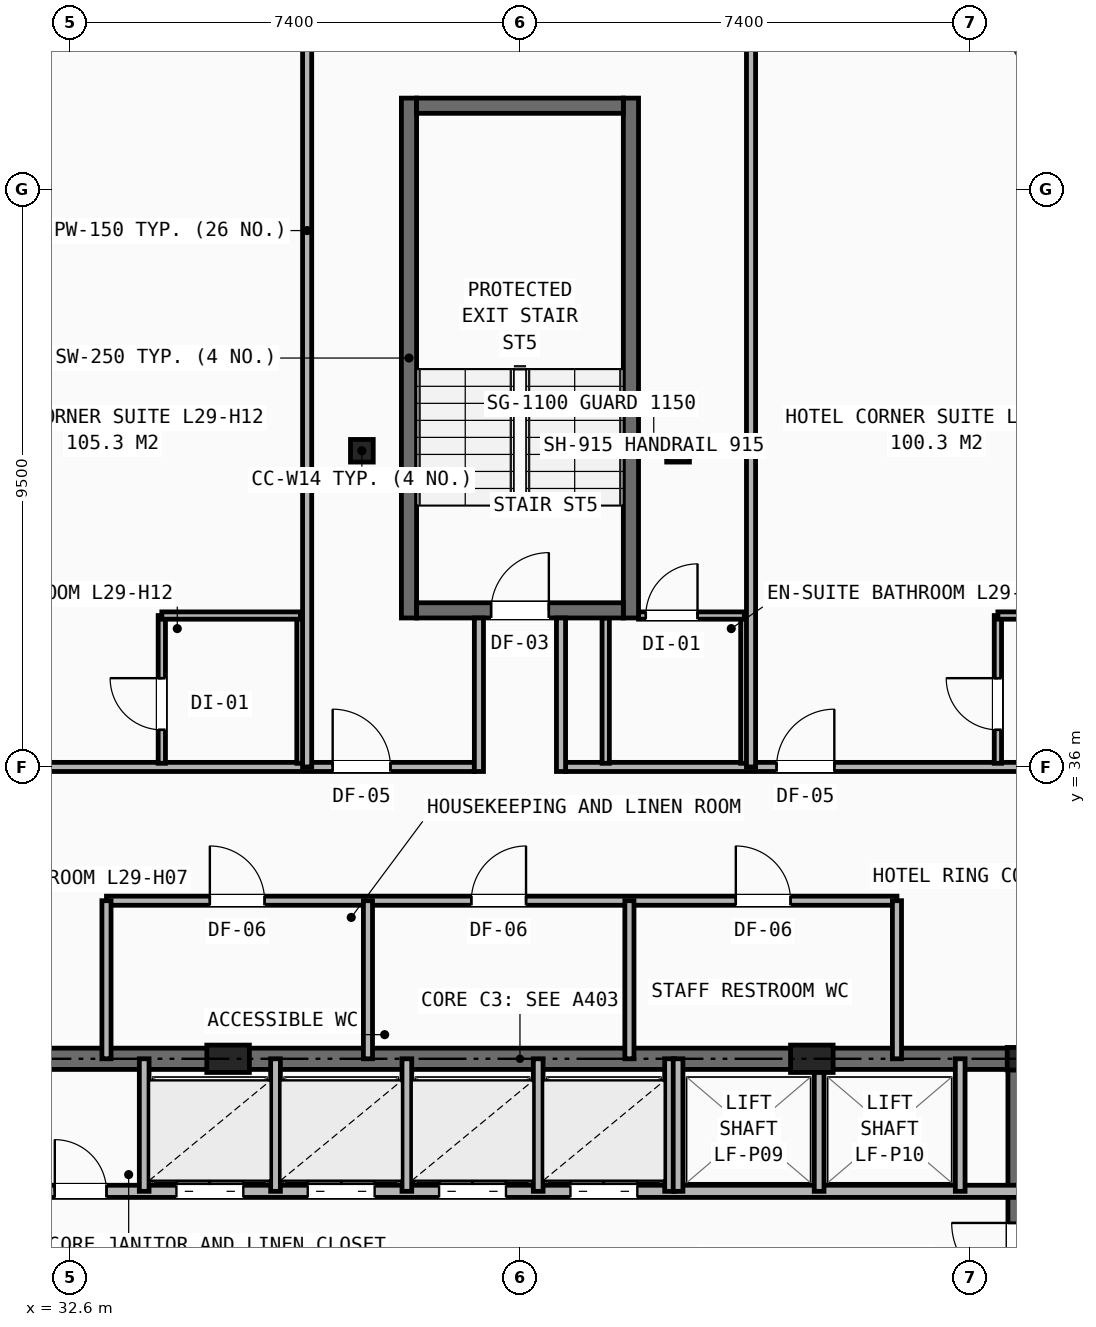
"""IFC4 building model, lengths in metres.
Left out: names, types, materials, properties, quantities, classifications, styles, units other than length and angle.
Written with IfcOpenShell. Run it as: python <this file> out.ifc"""

import sys

from ifc_helpers import new_model, si_unit, direction, frame, frame_2d, origin, origin_2d, place, context, subcontext, project, spatial, rectangle, i_section, extrude, element, fill, save


model = new_model("IFC4")
c1 = context("Model", 3, precision=1e-05, world=origin(), true_north=direction((0.0, 1.0)))
c2 = subcontext(c1, "Body", "Model", "MODEL_VIEW")
j1 = project(units=[si_unit("LENGTHUNIT", "METRE"), si_unit("PLANEANGLEUNIT", "RADIAN")], contexts=[c1])
p1 = place(None, origin())
s1 = spatial("IfcSite", under=j1, at=p1, CompositionType="ELEMENT")
p2 = place(p1, origin())
s2 = spatial("IfcBuilding", under=s1, at=p2, CompositionType="ELEMENT")
p3 = place(p2, frame((0.0, 0.0, 102.2)))
s3 = spatial("IfcBuildingStorey", under=s2, at=p3, CompositionType="ELEMENT", Elevation=102.2)
for number, where, z_axis, x_axis in (
    (1, (48.2, 31.2, 0.0), (0.0, 0.0, 1.0), (1.0, 0.0, 0.0)),
    (2, (37.4, 41.2, 0.0), (0.0, 0.0, 1.0), (1.0, 0.0, 0.0)),
    (3, (42.6, 41.2, 0.0), (0.0, 0.0, 1.0), (1.0, 0.0, 0.0)),
):
    element("IfcColumn", number, at=place(p3, frame(where, z_axis=z_axis, x_axis=x_axis)), inside=s3, PredefinedType="COLUMN", context=c2, shape_type="SweptSolid", body=[
        extrude(i_section(OverallWidth=0.374, OverallDepth=0.372, WebThickness=0.016, FlangeThickness=0.026, at=origin_2d()), origin(), (0.0, 0.0, 1.0), 3.2),
    ])
for number, where, z_axis, x_axis in (
    (4, (35.2, 31.2, 0.0), (0.0, 0.0, 1.0), (1.0, 0.0, 0.0)),
    (5, (44.8, 31.2, 0.0), (0.0, 0.0, 1.0), (1.0, 0.0, 0.0)),
):
    element("IfcColumn", number, at=place(p3, frame(where, z_axis=z_axis, x_axis=x_axis)), inside=s3, PredefinedType="PILASTER", context=c2, shape_type="SweptSolid", body=[
        extrude(rectangle(XDim=0.7, YDim=0.45, at=origin_2d()), origin(), (0.0, 0.0, 1.0), 3.2),
    ])
p4 = place(p3, frame((31.8, 31.2, 0.0), z_axis=(0.0, 0.0, 1.0), x_axis=(1.0, 0.0, 0.0)))
e6 = element("IfcWall", 6, at=p4, inside=s3, PredefinedType="SHEAR", context=c2, shape_type="SweptSolid", body=[
    extrude(rectangle(XDim=16.4, YDim=0.35, at=frame_2d((8.2, 0.0))), origin(), (0.0, 0.0, 1.0), 2.97),
])
p5 = place(p3, frame((48.2, 16.4, 0.0), z_axis=(0.0, 0.0, 1.0), x_axis=(0.0, 1.0, 0.0)))
e7 = element("IfcWall", 7, at=p5, inside=s3, PredefinedType="SHEAR", context=c2, shape_type="SweptSolid", body=[
    extrude(rectangle(XDim=14.8, YDim=0.35, at=frame_2d((7.4, 0.0))), origin(), (0.0, 0.0, 1.0), 2.97),
])
p6 = place(p5, frame((11.0, 0.0, 0.0)))
e8 = element("IfcOpeningElement", 8, at=p6, cuts=e7, PredefinedType="OPENING", context=c2, shape_type="SweptSolid", body=[
    extrude(rectangle(XDim=1.1, YDim=2.15, at=frame_2d((0.55, 1.075))), frame((0.0, 0.185, 0.0), z_axis=(0.0, -1.0, 0.0), x_axis=(1.0, 0.0, 0.0)), (0.0, 0.0, 1.0), 0.37),
])
p7 = place(p3, frame((31.8, 29.02, 0.0), z_axis=(0.0, 0.0, 1.0), x_axis=(1.0, 0.0, 0.0)))
e9 = element("IfcWall", 9, at=p7, inside=s3, PredefinedType="SOLIDWALL", context=c2, shape_type="SweptSolid", body=[
    extrude(rectangle(XDim=16.4, YDim=0.2, at=frame_2d((8.2, 0.0))), origin(), (0.0, 0.0, 1.0), 2.421),
])
p8 = place(p7, frame((0.55, 0.0, 0.0)))
e10 = element("IfcOpeningElement", 10, at=p8, cuts=e9, PredefinedType="OPENING", context=c2, shape_type="SweptSolid", body=[
    extrude(rectangle(XDim=0.85, YDim=2.05, at=frame_2d((0.425, 1.025))), frame((0.0, 0.11, 0.0), z_axis=(0.0, -1.0, 0.0), x_axis=(1.0, 0.0, 0.0)), (0.0, 0.0, 1.0), 0.22),
])
p9 = place(p7, frame((2.55, 0.0, 0.0)))
e11 = element("IfcOpeningElement", 11, at=p9, cuts=e9, PredefinedType="OPENING", context=c2, shape_type="SweptSolid", body=[
    extrude(rectangle(XDim=1.1, YDim=2.15, at=frame_2d((0.55, 1.075))), frame((0.0, 0.11, 0.0), z_axis=(0.0, -1.0, 0.0), x_axis=(1.0, 0.0, 0.0)), (0.0, 0.0, 1.0), 0.22),
])
p10 = place(p7, frame((4.71, 0.0, 0.0)))
e12 = element("IfcOpeningElement", 12, at=p10, cuts=e9, PredefinedType="OPENING", context=c2, shape_type="SweptSolid", body=[
    extrude(rectangle(XDim=1.1, YDim=2.15, at=frame_2d((0.55, 1.075))), frame((0.0, 0.11, 0.0), z_axis=(0.0, -1.0, 0.0), x_axis=(1.0, 0.0, 0.0)), (0.0, 0.0, 1.0), 0.22),
])
p11 = place(p7, frame((6.87, 0.0, 0.0)))
e13 = element("IfcOpeningElement", 13, at=p11, cuts=e9, PredefinedType="OPENING", context=c2, shape_type="SweptSolid", body=[
    extrude(rectangle(XDim=1.1, YDim=2.15, at=frame_2d((0.55, 1.075))), frame((0.0, 0.11, 0.0), z_axis=(0.0, -1.0, 0.0), x_axis=(1.0, 0.0, 0.0)), (0.0, 0.0, 1.0), 0.22),
])
p12 = place(p7, frame((9.03, 0.0, 0.0)))
e14 = element("IfcOpeningElement", 14, at=p12, cuts=e9, PredefinedType="OPENING", context=c2, shape_type="SweptSolid", body=[
    extrude(rectangle(XDim=1.1, YDim=2.15, at=frame_2d((0.55, 1.075))), frame((0.0, 0.11, 0.0), z_axis=(0.0, -1.0, 0.0), x_axis=(1.0, 0.0, 0.0)), (0.0, 0.0, 1.0), 0.22),
])
for number, where, z_axis, x_axis in (
    (15, (33.82, 29.02, 0.0), (0.0, 0.0, 1.0), (0.0, 1.0, 0.0)),
    (16, (35.98, 29.02, 0.0), (0.0, 0.0, 1.0), (0.0, 1.0, 0.0)),
    (17, (38.14, 29.02, 0.0), (0.0, 0.0, 1.0), (0.0, 1.0, 0.0)),
    (18, (40.3, 29.02, 0.0), (0.0, 0.0, 1.0), (0.0, 1.0, 0.0)),
    (19, (42.46, 29.02, 0.0), (0.0, 0.0, 1.0), (0.0, 1.0, 0.0)),
    (20, (42.6, 29.02, 0.0), (0.0, 0.0, 1.0), (0.0, 1.0, 0.0)),
    (21, (44.92, 29.02, 0.0), (0.0, 0.0, 1.0), (0.0, 1.0, 0.0)),
    (22, (47.24, 29.02, 0.0), (0.0, 0.0, 1.0), (0.0, 1.0, 0.0)),
):
    element("IfcWall", number, at=place(p3, frame(where, z_axis=z_axis, x_axis=x_axis)), inside=s3, PredefinedType="SOLIDWALL", context=c2, shape_type="SweptSolid", body=[
        extrude(rectangle(XDim=2.18, YDim=0.16, at=frame_2d((1.09, 0.0))), origin(), (0.0, 0.0, 1.0), 2.421),
    ])
p13 = place(p3, frame((33.2, 33.8, 0.0), z_axis=(0.0, 0.0, 1.0), x_axis=(1.0, 0.0, 0.0)))
e23 = element("IfcWall", 23, at=p13, inside=s3, PredefinedType="PARTITIONING", context=c2, shape_type="SweptSolid", body=[
    extrude(rectangle(XDim=13.0, YDim=0.15, at=frame_2d((6.5, 0.0))), origin(), (0.0, 0.0, 1.0), 2.97),
])
p14 = place(p13, frame((1.7, 0.0, 0.0)))
e24 = element("IfcOpeningElement", 24, at=p14, cuts=e23, PredefinedType="OPENING", context=c2, shape_type="SweptSolid", body=[
    extrude(rectangle(XDim=0.9, YDim=2.1, at=frame_2d((0.45, 1.05))), frame((0.0, 0.085, 0.0), z_axis=(0.0, -1.0, 0.0), x_axis=(1.0, 0.0, 0.0)), (0.0, 0.0, 1.0), 0.17),
])
p15 = place(p13, frame((6.0, 0.0, 0.0)))
e25 = element("IfcOpeningElement", 25, at=p15, cuts=e23, PredefinedType="OPENING", context=c2, shape_type="SweptSolid", body=[
    extrude(rectangle(XDim=0.9, YDim=2.1, at=frame_2d((0.45, 1.05))), frame((0.0, 0.085, 0.0), z_axis=(0.0, -1.0, 0.0), x_axis=(1.0, 0.0, 0.0)), (0.0, 0.0, 1.0), 0.17),
])
p16 = place(p13, frame((10.35, 0.0, 0.0)))
e26 = element("IfcOpeningElement", 26, at=p16, cuts=e23, PredefinedType="OPENING", context=c2, shape_type="SweptSolid", body=[
    extrude(rectangle(XDim=0.9, YDim=2.1, at=frame_2d((0.45, 1.05))), frame((0.0, 0.085, 0.0), z_axis=(0.0, -1.0, 0.0), x_axis=(1.0, 0.0, 0.0)), (0.0, 0.0, 1.0), 0.17),
])
for number, where, z_axis, x_axis in (
    (27, (33.2, 31.2, 0.0), (0.0, 0.0, 1.0), (0.0, 1.0, 0.0)),
    (28, (46.2, 31.2, 0.0), (0.0, 0.0, 1.0), (0.0, 1.0, 0.0)),
    (29, (37.5, 31.2, 0.0), (0.0, 0.0, 1.0), (0.0, 1.0, 0.0)),
    (30, (41.8, 31.2, 0.0), (0.0, 0.0, 1.0), (0.0, 1.0, 0.0)),
):
    element("IfcWall", number, at=place(p3, frame(where, z_axis=z_axis, x_axis=x_axis)), inside=s3, PredefinedType="PARTITIONING", context=c2, shape_type="SweptSolid", body=[
        extrude(rectangle(XDim=2.6, YDim=0.15, at=frame_2d((1.3, 0.0))), origin(), (0.0, 0.0, 1.0), 2.421),
    ])
p17 = place(p3, frame((29.6, 36.0, 0.0), z_axis=(0.0, 0.0, 1.0), x_axis=(1.0, 0.0, 0.0)))
e31 = element("IfcWall", 31, at=p17, inside=s3, PredefinedType="PARTITIONING", context=c2, shape_type="SweptSolid", body=[
    extrude(rectangle(XDim=9.65, YDim=0.15, at=frame_2d((4.825, 0.0))), origin(), (0.0, 0.0, 1.0), 2.503),
])
p18 = place(p17, frame((0.57, 0.0, 0.0)))
e32 = element("IfcOpeningElement", 32, at=p18, cuts=e31, PredefinedType="OPENING", context=c2, shape_type="SweptSolid", body=[
    extrude(rectangle(XDim=0.95, YDim=2.1, at=frame_2d((0.475, 1.05))), frame((0.0, 0.085, 0.0), z_axis=(0.0, -1.0, 0.0), x_axis=(1.0, 0.0, 0.0)), (0.0, 0.0, 1.0), 0.17),
])
p19 = place(p17, frame((7.32, 0.0, 0.0)))
e33 = element("IfcOpeningElement", 33, at=p19, cuts=e31, PredefinedType="OPENING", context=c2, shape_type="SweptSolid", body=[
    extrude(rectangle(XDim=0.95, YDim=2.1, at=frame_2d((0.475, 1.05))), frame((0.0, 0.085, 0.0), z_axis=(0.0, -1.0, 0.0), x_axis=(1.0, 0.0, 0.0)), (0.0, 0.0, 1.0), 0.17),
])
p20 = place(p3, frame((40.75, 36.0, 0.0), z_axis=(0.0, 0.0, 1.0), x_axis=(1.0, 0.0, 0.0)))
e34 = element("IfcWall", 34, at=p20, inside=s3, PredefinedType="PARTITIONING", context=c2, shape_type="SweptSolid", body=[
    extrude(rectangle(XDim=9.65, YDim=0.15, at=frame_2d((4.825, 0.0))), origin(), (0.0, 0.0, 1.0), 2.503),
])
p21 = place(p20, frame((3.47, 0.0, 0.0)))
e35 = element("IfcOpeningElement", 35, at=p21, cuts=e34, PredefinedType="OPENING", context=c2, shape_type="SweptSolid", body=[
    extrude(rectangle(XDim=0.95, YDim=2.1, at=frame_2d((0.475, 1.05))), frame((0.0, 0.085, 0.0), z_axis=(0.0, -1.0, 0.0), x_axis=(1.0, 0.0, 0.0)), (0.0, 0.0, 1.0), 0.17),
])
p22 = place(p3, frame((34.11, 36.06, 0.0), z_axis=(0.0, 0.0, 1.0), x_axis=(0.0, 1.0, 0.0)))
e36 = element("IfcWall", 36, at=p22, inside=s3, PredefinedType="PARTITIONING", context=c2, shape_type="SweptSolid", body=[
    extrude(rectangle(XDim=2.43, YDim=0.12, at=frame_2d((1.215, 0.0))), origin(), (0.0, 0.0, 1.0), 2.97),
])
p23 = place(p22, frame((0.55, 0.0, 0.0)))
e37 = element("IfcOpeningElement", 37, at=p23, cuts=e36, PredefinedType="OPENING", context=c2, shape_type="SweptSolid", body=[
    extrude(rectangle(XDim=0.85, YDim=2.05, at=frame_2d((0.425, 1.025))), frame((0.0, 0.07, 0.0), z_axis=(0.0, -1.0, 0.0), x_axis=(1.0, 0.0, 0.0)), (0.0, 0.0, 1.0), 0.14),
])
p24 = place(p3, frame((36.39, 36.06, 0.0), z_axis=(0.0, 0.0, 1.0), x_axis=(0.0, 1.0, 0.0)))
e38 = element("IfcWall", 38, at=p24, inside=s3, PredefinedType="PARTITIONING", context=c2, shape_type="SweptSolid", body=[
    extrude(rectangle(XDim=2.43, YDim=0.12, at=frame_2d((1.215, 0.0))), origin(), (0.0, 0.0, 1.0), 2.97),
])
p25 = place(p3, frame((34.11, 38.49, 0.0), z_axis=(0.0, 0.0, 1.0), x_axis=(1.0, 0.0, 0.0)))
e39 = element("IfcWall", 39, at=p25, inside=s3, PredefinedType="PARTITIONING", context=c2, shape_type="SweptSolid", body=[
    extrude(rectangle(XDim=2.28, YDim=0.12, at=frame_2d((1.14, 0.0))), origin(), (0.0, 0.0, 1.0), 2.97),
])
p26 = place(p3, frame((36.5, 36.0, 0.0), z_axis=(0.0, 0.0, 1.0), x_axis=(0.0, 1.0, 0.0)))
e40 = element("IfcWall", 40, at=p26, inside=s3, PredefinedType="PARTITIONING", context=c2, shape_type="SweptSolid", body=[
    extrude(rectangle(XDim=17.643, YDim=0.15, at=frame_2d((8.821, 0.0))), origin(), (0.0, 0.0, 1.0), 2.258),
])
p27 = place(p3, frame((41.41, 36.06, 0.0), z_axis=(0.0, 0.0, 1.0), x_axis=(0.0, 1.0, 0.0)))
e41 = element("IfcWall", 41, at=p27, inside=s3, PredefinedType="PARTITIONING", context=c2, shape_type="SweptSolid", body=[
    extrude(rectangle(XDim=2.39, YDim=0.12, at=frame_2d((1.195, 0.0))), origin(), (0.0, 0.0, 1.0), 2.97),
])
p28 = place(p3, frame((43.69, 36.06, 0.0), z_axis=(0.0, 0.0, 1.0), x_axis=(0.0, 1.0, 0.0)))
e42 = element("IfcWall", 42, at=p28, inside=s3, PredefinedType="PARTITIONING", context=c2, shape_type="SweptSolid", body=[
    extrude(rectangle(XDim=2.43, YDim=0.12, at=frame_2d((1.215, 0.0))), origin(), (0.0, 0.0, 1.0), 2.97),
])
p29 = place(p3, frame((41.95, 38.49, 0.0), z_axis=(0.0, 0.0, 1.0), x_axis=(1.0, 0.0, 0.0)))
e43 = element("IfcWall", 43, at=p29, inside=s3, PredefinedType="PARTITIONING", context=c2, shape_type="SweptSolid", body=[
    extrude(rectangle(XDim=1.74, YDim=0.12, at=frame_2d((0.87, 0.0))), origin(), (0.0, 0.0, 1.0), 2.97),
])
p30 = place(p29, frame((0.12, 0.0, 0.0)))
e44 = element("IfcOpeningElement", 44, at=p30, cuts=e43, PredefinedType="OPENING", context=c2, shape_type="SweptSolid", body=[
    extrude(rectangle(XDim=0.85, YDim=2.05, at=frame_2d((0.425, 1.025))), frame((0.0, 0.07, 0.0), z_axis=(0.0, -1.0, 0.0), x_axis=(1.0, 0.0, 0.0)), (0.0, 0.0, 1.0), 0.14),
])
p31 = place(p3, frame((43.8, 36.0, 0.0), z_axis=(0.0, 0.0, 1.0), x_axis=(0.0, 1.0, 0.0)))
e45 = element("IfcWall", 45, at=p31, inside=s3, PredefinedType="PARTITIONING", context=c2, shape_type="SweptSolid", body=[
    extrude(rectangle(XDim=17.643, YDim=0.15, at=frame_2d((8.821, 0.0))), origin(), (0.0, 0.0, 1.0), 2.258),
])
p32 = place(p3, frame((47.86, 36.06, 0.0), z_axis=(0.0, 0.0, 1.0), x_axis=(0.0, 1.0, 0.0)))
e46 = element("IfcWall", 46, at=p32, inside=s3, PredefinedType="PARTITIONING", context=c2, shape_type="SweptSolid", body=[
    extrude(rectangle(XDim=2.43, YDim=0.12, at=frame_2d((1.215, 0.0))), origin(), (0.0, 0.0, 1.0), 2.503),
])
p33 = place(p32, frame((0.55, 0.0, 0.0)))
e47 = element("IfcOpeningElement", 47, at=p33, cuts=e46, PredefinedType="OPENING", context=c2, shape_type="SweptSolid", body=[
    extrude(rectangle(XDim=0.85, YDim=2.05, at=frame_2d((0.425, 1.025))), frame((0.0, 0.07, 0.0), z_axis=(0.0, -1.0, 0.0), x_axis=(1.0, 0.0, 0.0)), (0.0, 0.0, 1.0), 0.14),
])
p34 = place(p3, frame((47.86, 38.49, 0.0), z_axis=(0.0, 0.0, 1.0), x_axis=(1.0, 0.0, 0.0)))
e48 = element("IfcWall", 48, at=p34, inside=s3, PredefinedType="PARTITIONING", context=c2, shape_type="SweptSolid", body=[
    extrude(rectangle(XDim=2.28, YDim=0.12, at=frame_2d((1.14, 0.0))), origin(), (0.0, 0.0, 1.0), 2.503),
])
for number, where, z_axis, x_axis in (
    (49, (38.175, 38.45, 0.0), (0.0, 0.0, 1.0), (0.0, 1.0, 0.0)),
    (50, (41.825, 38.45, 0.0), (0.0, 0.0, 1.0), (0.0, 1.0, 0.0)),
):
    element("IfcWall", number, at=place(p3, frame(where, z_axis=z_axis, x_axis=x_axis)), inside=s3, PredefinedType="SHEAR", context=c2, shape_type="SweptSolid", body=[
        extrude(rectangle(XDim=8.55, YDim=0.25, at=frame_2d((4.275, 0.0))), origin(), (0.0, 0.0, 1.0), 2.97),
    ])
p35 = place(p3, frame((38.3, 38.575, 0.0), z_axis=(0.0, 0.0, 1.0), x_axis=(1.0, 0.0, 0.0)))
e51 = element("IfcWall", 51, at=p35, inside=s3, PredefinedType="SHEAR", context=c2, shape_type="SweptSolid", body=[
    extrude(rectangle(XDim=3.4, YDim=0.25, at=frame_2d((1.7, 0.0))), origin(), (0.0, 0.0, 1.0), 2.97),
])
p36 = place(p35, frame((1.225, 0.0, 0.0)))
e52 = element("IfcOpeningElement", 52, at=p36, cuts=e51, PredefinedType="OPENING", context=c2, shape_type="SweptSolid", body=[
    extrude(rectangle(XDim=0.95, YDim=2.1, at=frame_2d((0.475, 1.05))), frame((0.0, 0.135, 0.0), z_axis=(0.0, -1.0, 0.0), x_axis=(1.0, 0.0, 0.0)), (0.0, 0.0, 1.0), 0.27),
])
p37 = place(p3, frame((38.3, 46.875, 0.0), z_axis=(0.0, 0.0, 1.0), x_axis=(1.0, 0.0, 0.0)))
e53 = element("IfcWall", 53, at=p37, inside=s3, PredefinedType="SHEAR", context=c2, shape_type="SweptSolid", body=[
    extrude(rectangle(XDim=3.4, YDim=0.25, at=frame_2d((1.7, 0.0))), origin(), (0.0, 0.0, 1.0), 2.97),
])
for number, where, z_axis, x_axis in (
    (54, (39.325, 35.925, 0.0), (0.0, 0.0, 1.0), (0.0, 1.0, 0.0)),
    (55, (40.675, 35.925, 0.0), (0.0, 0.0, 1.0), (0.0, 1.0, 0.0)),
):
    element("IfcWall", number, at=place(p3, frame(where, z_axis=z_axis, x_axis=x_axis)), inside=s3, PredefinedType="PARTITIONING", context=c2, shape_type="SweptSolid", body=[
        extrude(rectangle(XDim=2.525, YDim=0.15, at=frame_2d((1.262, 0.0))), origin(), (0.0, 0.0, 1.0), 2.97),
    ])
p38 = place(p8, origin())
e56 = element("IfcDoor", 56, at=p38, inside=s3, OperationType="SINGLE_SWING_LEFT", PredefinedType="DOOR", context=c2, shape_type="SweptSolid", body=[
    extrude(rectangle(XDim=0.85, YDim=2.05, at=frame_2d((0.425, 1.025))), frame((0.0, 0.025, 0.0), z_axis=(0.0, -1.0, 0.0), x_axis=(1.0, 0.0, 0.0)), (0.0, 0.0, 1.0), 0.05),
])
fill(e10, e56)
p39 = place(p9, origin())
e57 = element("IfcDoor", 57, at=p39, inside=s3, OperationType="DOUBLE_DOOR_SLIDING", PredefinedType="DOOR", context=c2, shape_type="SweptSolid", body=[
    extrude(rectangle(XDim=1.1, YDim=2.15, at=frame_2d((0.55, 1.075))), frame((0.0, 0.025, 0.0), z_axis=(0.0, -1.0, 0.0), x_axis=(1.0, 0.0, 0.0)), (0.0, 0.0, 1.0), 0.05),
])
fill(e11, e57)
p40 = place(p10, origin())
e58 = element("IfcDoor", 58, at=p40, inside=s3, OperationType="DOUBLE_DOOR_SLIDING", PredefinedType="DOOR", context=c2, shape_type="SweptSolid", body=[
    extrude(rectangle(XDim=1.1, YDim=2.15, at=frame_2d((0.55, 1.075))), frame((0.0, 0.025, 0.0), z_axis=(0.0, -1.0, 0.0), x_axis=(1.0, 0.0, 0.0)), (0.0, 0.0, 1.0), 0.05),
])
fill(e12, e58)
p41 = place(p11, origin())
e59 = element("IfcDoor", 59, at=p41, inside=s3, OperationType="DOUBLE_DOOR_SLIDING", PredefinedType="DOOR", context=c2, shape_type="SweptSolid", body=[
    extrude(rectangle(XDim=1.1, YDim=2.15, at=frame_2d((0.55, 1.075))), frame((0.0, 0.025, 0.0), z_axis=(0.0, -1.0, 0.0), x_axis=(1.0, 0.0, 0.0)), (0.0, 0.0, 1.0), 0.05),
])
fill(e13, e59)
p42 = place(p12, origin())
e60 = element("IfcDoor", 60, at=p42, inside=s3, OperationType="DOUBLE_DOOR_SLIDING", PredefinedType="DOOR", context=c2, shape_type="SweptSolid", body=[
    extrude(rectangle(XDim=1.1, YDim=2.15, at=frame_2d((0.55, 1.075))), frame((0.0, 0.025, 0.0), z_axis=(0.0, -1.0, 0.0), x_axis=(1.0, 0.0, 0.0)), (0.0, 0.0, 1.0), 0.05),
])
fill(e14, e60)
p43 = place(p14, origin())
e61 = element("IfcDoor", 61, at=p43, inside=s3, OperationType="SINGLE_SWING_LEFT", PredefinedType="DOOR", context=c2, shape_type="SweptSolid", body=[
    extrude(rectangle(XDim=0.9, YDim=2.1, at=frame_2d((0.45, 1.05))), frame((0.0, 0.025, 0.0), z_axis=(0.0, -1.0, 0.0), x_axis=(1.0, 0.0, 0.0)), (0.0, 0.0, 1.0), 0.05),
])
fill(e24, e61)
p44 = place(p15, origin())
e62 = element("IfcDoor", 62, at=p44, inside=s3, OperationType="SINGLE_SWING_RIGHT", PredefinedType="DOOR", context=c2, shape_type="SweptSolid", body=[
    extrude(rectangle(XDim=0.9, YDim=2.1, at=frame_2d((0.45, 1.05))), frame((0.0, 0.025, 0.0), z_axis=(0.0, -1.0, 0.0), x_axis=(1.0, 0.0, 0.0)), (0.0, 0.0, 1.0), 0.05),
])
fill(e25, e62)
p45 = place(p16, origin())
e63 = element("IfcDoor", 63, at=p45, inside=s3, OperationType="SINGLE_SWING_LEFT", PredefinedType="DOOR", context=c2, shape_type="SweptSolid", body=[
    extrude(rectangle(XDim=0.9, YDim=2.1, at=frame_2d((0.45, 1.05))), frame((0.0, 0.025, 0.0), z_axis=(0.0, -1.0, 0.0), x_axis=(1.0, 0.0, 0.0)), (0.0, 0.0, 1.0), 0.05),
])
fill(e26, e63)
p46 = place(p23, origin())
e64 = element("IfcDoor", 64, at=p46, inside=s3, OperationType="SINGLE_SWING_RIGHT", PredefinedType="DOOR", context=c2, shape_type="SweptSolid", body=[
    extrude(rectangle(XDim=0.85, YDim=2.05, at=frame_2d((0.425, 1.025))), frame((0.0, 0.025, 0.0), z_axis=(0.0, -1.0, 0.0), x_axis=(1.0, 0.0, 0.0)), (0.0, 0.0, 1.0), 0.05),
])
fill(e37, e64)
p47 = place(p19, origin())
e65 = element("IfcDoor", 65, at=p47, inside=s3, OperationType="SINGLE_SWING_LEFT", PredefinedType="DOOR", context=c2, shape_type="SweptSolid", body=[
    extrude(rectangle(XDim=0.95, YDim=2.1, at=frame_2d((0.475, 1.05))), frame((0.0, 0.025, 0.0), z_axis=(0.0, -1.0, 0.0), x_axis=(1.0, 0.0, 0.0)), (0.0, 0.0, 1.0), 0.05),
])
fill(e33, e65)
p48 = place(p30, origin())
e66 = element("IfcDoor", 66, at=p48, inside=s3, OperationType="SINGLE_SWING_RIGHT", PredefinedType="DOOR", context=c2, shape_type="SweptSolid", body=[
    extrude(rectangle(XDim=0.85, YDim=2.05, at=frame_2d((0.425, 1.025))), frame((0.0, 0.025, 0.0), z_axis=(0.0, -1.0, 0.0), x_axis=(1.0, 0.0, 0.0)), (0.0, 0.0, 1.0), 0.05),
])
fill(e44, e66)
p49 = place(p21, origin())
e67 = element("IfcDoor", 67, at=p49, inside=s3, OperationType="SINGLE_SWING_RIGHT", PredefinedType="DOOR", context=c2, shape_type="SweptSolid", body=[
    extrude(rectangle(XDim=0.95, YDim=2.1, at=frame_2d((0.475, 1.05))), frame((0.0, 0.025, 0.0), z_axis=(0.0, -1.0, 0.0), x_axis=(1.0, 0.0, 0.0)), (0.0, 0.0, 1.0), 0.05),
])
fill(e35, e67)
p50 = place(p33, origin())
e68 = element("IfcDoor", 68, at=p50, inside=s3, OperationType="SINGLE_SWING_RIGHT", PredefinedType="DOOR", context=c2, shape_type="SweptSolid", body=[
    extrude(rectangle(XDim=0.85, YDim=2.05, at=frame_2d((0.425, 1.025))), frame((0.0, 0.025, 0.0), z_axis=(0.0, -1.0, 0.0), x_axis=(1.0, 0.0, 0.0)), (0.0, 0.0, 1.0), 0.05),
])
fill(e47, e68)
p51 = place(p36, origin())
e69 = element("IfcDoor", 69, at=p51, inside=s3, OperationType="SINGLE_SWING_RIGHT", PredefinedType="DOOR", context=c2, shape_type="SweptSolid", body=[
    extrude(rectangle(XDim=0.95, YDim=2.1, at=frame_2d((0.475, 1.05))), frame((0.0, 0.025, 0.0), z_axis=(0.0, -1.0, 0.0), x_axis=(1.0, 0.0, 0.0)), (0.0, 0.0, 1.0), 0.05),
])
fill(e52, e69)
save(model, sys.argv[1])
